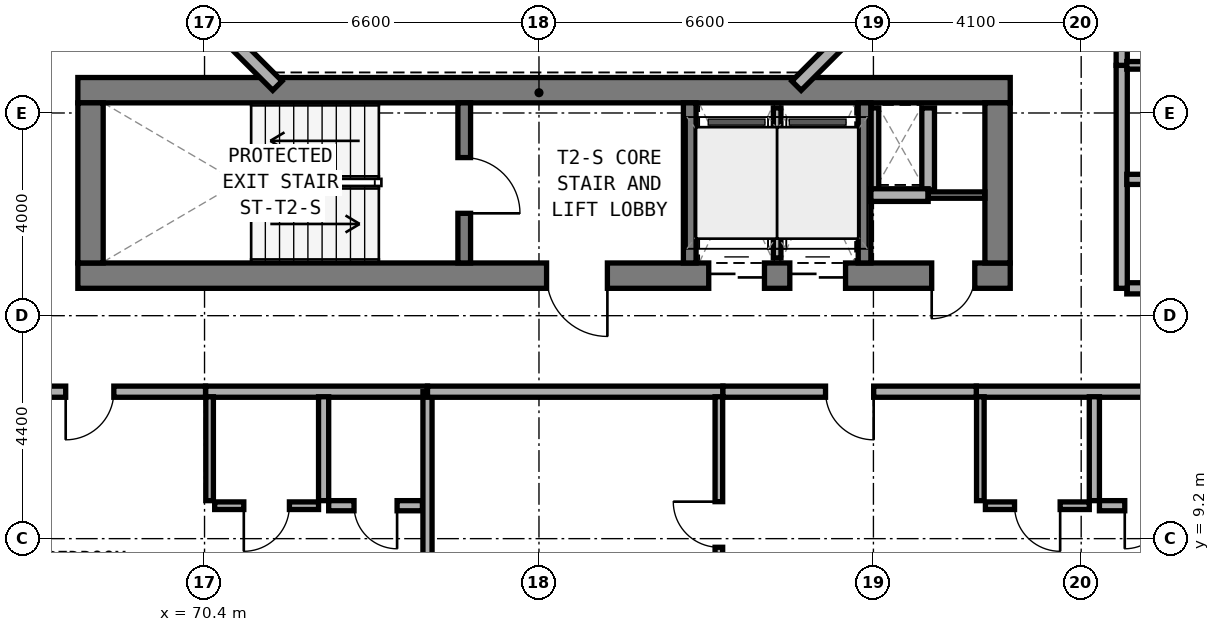
"""IFC4 building model, lengths in metres.
Left out: names, types, materials, properties, quantities, classifications, styles, units other than length and angle.
Written with IfcOpenShell. Run it as: python <this file> out.ifc"""

import sys

from ifc_helpers import new_model, si_unit, direction, frame, frame_2d, origin, place, context, subcontext, project, spatial, rectangle, extrude, element, fill, save


model = new_model("IFC4")
c1 = context("Model", 3, precision=1e-05, world=origin(), true_north=direction((0.0, 1.0)))
c2 = subcontext(c1, "Body", "Model", "MODEL_VIEW")
j1 = project(units=[si_unit("LENGTHUNIT", "METRE"), si_unit("PLANEANGLEUNIT", "RADIAN")], contexts=[c1])
p1 = place(None, origin())
s1 = spatial("IfcSite", under=j1, at=p1, CompositionType="ELEMENT")
p2 = place(p1, origin())
s2 = spatial("IfcBuilding", under=s1, at=p2, CompositionType="ELEMENT")
p3 = place(p2, frame((0.0, 0.0, 73.0)))
s3 = spatial("IfcBuildingStorey", under=s2, at=p3, CompositionType="ELEMENT", Elevation=73.0)
p4 = place(p3, frame((67.9, 14.39, 0.0), z_axis=(0.0, 0.0, 1.0), x_axis=(1.0, 0.0, 0.0)))
e1 = element("IfcWall", 1, at=p4, inside=s3, PredefinedType="SHEAR", context=c2, shape_type="SweptSolid", body=[
    extrude(rectangle(XDim=18.4, YDim=0.5, at=frame_2d((9.2, 0.0))), origin(), (0.0, 0.0, 1.0), 3.5),
])
p5 = place(p4, frame((9.25, 0.0, 0.0)))
e2 = element("IfcOpeningElement", 2, at=p5, cuts=e1, PredefinedType="OPENING", context=c2, shape_type="SweptSolid", body=[
    extrude(rectangle(XDim=1.2, YDim=2.15, at=frame_2d((0.6, 1.075))), frame((0.0, 0.26, 0.0), z_axis=(0.0, -1.0, 0.0), x_axis=(1.0, 0.0, 0.0)), (0.0, 0.0, 1.0), 0.52),
])
p6 = place(p4, frame((16.85, 0.0, 0.0)))
e3 = element("IfcOpeningElement", 3, at=p6, cuts=e1, PredefinedType="OPENING", context=c2, shape_type="SweptSolid", body=[
    extrude(rectangle(XDim=0.85, YDim=2.1, at=frame_2d((0.425, 1.05))), frame((0.0, 0.26, 0.0), z_axis=(0.0, -1.0, 0.0), x_axis=(1.0, 0.0, 0.0)), (0.0, 0.0, 1.0), 0.52),
])
p7 = place(p4, frame((12.45, 0.0, 0.0)))
e4 = element("IfcOpeningElement", 4, at=p7, cuts=e1, PredefinedType="OPENING", context=c2, shape_type="SweptSolid", body=[
    extrude(rectangle(XDim=1.1, YDim=2.15, at=frame_2d((0.55, 1.075))), frame((0.0, 0.26, 0.0), z_axis=(0.0, -1.0, 0.0), x_axis=(1.0, 0.0, 0.0)), (0.0, 0.0, 1.0), 0.52),
])
p8 = place(p4, frame((14.05, 0.0, 0.0)))
e5 = element("IfcOpeningElement", 5, at=p8, cuts=e1, PredefinedType="OPENING", context=c2, shape_type="SweptSolid", body=[
    extrude(rectangle(XDim=1.1, YDim=2.15, at=frame_2d((0.55, 1.075))), frame((0.0, 0.26, 0.0), z_axis=(0.0, -1.0, 0.0), x_axis=(1.0, 0.0, 0.0)), (0.0, 0.0, 1.0), 0.52),
])
p9 = place(p3, frame((67.9, 18.05, 0.0), z_axis=(0.0, 0.0, 1.0), x_axis=(1.0, 0.0, 0.0)))
e6 = element("IfcWall", 6, at=p9, inside=s3, PredefinedType="SHEAR", context=c2, shape_type="SweptSolid", body=[
    extrude(rectangle(XDim=18.4, YDim=0.5, at=frame_2d((9.2, 0.0))), origin(), (0.0, 0.0, 1.0), 3.5),
])
for number, where, z_axis, x_axis in (
    (7, (68.15, 14.64, 0.0), (0.0, 0.0, 1.0), (0.0, 1.0, 0.0)),
    (8, (86.05, 14.64, 0.0), (0.0, 0.0, 1.0), (0.0, 1.0, 0.0)),
):
    element("IfcWall", number, at=place(p3, frame(where, z_axis=z_axis, x_axis=x_axis)), inside=s3, PredefinedType="SHEAR", context=c2, shape_type="SweptSolid", body=[
        extrude(rectangle(XDim=3.16, YDim=0.5, at=frame_2d((1.58, 0.0))), origin(), (0.0, 0.0, 1.0), 3.5),
    ])
p10 = place(p3, frame((75.525, 14.64, 0.0), z_axis=(0.0, 0.0, 1.0), x_axis=(0.0, 1.0, 0.0)))
e9 = element("IfcWall", 9, at=p10, inside=s3, PredefinedType="STANDARD", context=c2, shape_type="SweptSolid", body=[
    extrude(rectangle(XDim=3.16, YDim=0.25, at=frame_2d((1.58, 0.0))), origin(), (0.0, 0.0, 1.0), 3.25),
])
p11 = place(p10, frame((0.98, 0.0, 0.0)))
e10 = element("IfcOpeningElement", 10, at=p11, cuts=e9, PredefinedType="OPENING", context=c2, shape_type="SweptSolid", body=[
    extrude(rectangle(XDim=1.1, YDim=2.15, at=frame_2d((0.55, 1.075))), frame((0.0, 0.135, 0.0), z_axis=(0.0, -1.0, 0.0), x_axis=(1.0, 0.0, 0.0)), (0.0, 0.0, 1.0), 0.27),
])
for number, where, z_axis, x_axis in (
    (11, (79.975, 14.64, 0.0), (0.0, 0.0, 1.0), (0.0, 1.0, 0.0)),
    (12, (83.425, 14.64, 0.0), (0.0, 0.0, 1.0), (0.0, 1.0, 0.0)),
):
    element("IfcWall", number, at=place(p3, frame(where, z_axis=z_axis, x_axis=x_axis)), inside=s3, PredefinedType="STANDARD", context=c2, shape_type="SweptSolid", body=[
        extrude(rectangle(XDim=3.16, YDim=0.25, at=frame_2d((1.58, 0.0))), origin(), (0.0, 0.0, 1.0), 3.25),
    ])
for number, where, z_axis, x_axis in (
    (13, (82.082, 18.138, 0.0), (0.0, 0.0, 1.0), (0.707, 0.707, 0.0)),
    (14, (70.204, 19.772, 0.0), (0.0, 0.0, 1.0), (0.707, -0.707, 0.0)),
):
    element("IfcWall", number, at=place(p3, frame(where, z_axis=z_axis, x_axis=x_axis)), inside=s3, PredefinedType="STANDARD", context=c2, shape_type="SweptSolid", body=[
        extrude(rectangle(XDim=2.311, YDim=0.26, at=frame_2d((1.155, 0.0))), origin(), (0.0, 0.0, 1.0), 3.25),
    ])
p12 = place(p3, frame((83.63, 16.08, 0.0), z_axis=(0.0, 0.0, 1.0), x_axis=(0.0, 1.0, 0.0)))
e15 = element("IfcWall", 15, at=p12, inside=s3, PredefinedType="PARTITIONING", context=c2, shape_type="SweptSolid", body=[
    extrude(rectangle(XDim=1.62, YDim=0.15, at=frame_2d((0.81, 0.0))), origin(), (0.0, 0.0, 1.0), 2.725),
])
p13 = place(p3, frame((84.68, 16.08, 0.0), z_axis=(0.0, 0.0, 1.0), x_axis=(0.0, 1.0, 0.0)))
e16 = element("IfcWall", 16, at=p13, inside=s3, PredefinedType="SOLIDWALL", context=c2, shape_type="SweptSolid", body=[
    extrude(rectangle(XDim=1.62, YDim=0.25, at=frame_2d((0.81, 0.0))), origin(), (0.0, 0.0, 1.0), 3.22),
])
p14 = place(p3, frame((83.55, 15.98, 0.0), z_axis=(0.0, 0.0, 1.0), x_axis=(1.0, 0.0, 0.0)))
e17 = element("IfcWall", 17, at=p14, inside=s3, PredefinedType="SOLIDWALL", context=c2, shape_type="SweptSolid", body=[
    extrude(rectangle(XDim=1.13, YDim=0.25, at=frame_2d((0.565, 0.0))), origin(), (0.0, 0.0, 1.0), 3.22),
])
p15 = place(p3, frame((84.68, 15.98, 0.0), z_axis=(0.0, 0.0, 1.0), x_axis=(1.0, 0.0, 0.0)))
e18 = element("IfcWall", 18, at=p15, inside=s3, PredefinedType="PARTITIONING", context=c2, shape_type="SweptSolid", body=[
    extrude(rectangle(XDim=1.12, YDim=0.125, at=frame_2d((0.56, 0.0))), origin(), (0.0, 0.0, 1.0), 3.22),
])
p16 = place(p3, frame((81.7, 14.74, 0.0), z_axis=(0.0, 0.0, 1.0), x_axis=(0.0, 1.0, 0.0)))
e19 = element("IfcWall", 19, at=p16, inside=s3, PredefinedType="PARTITIONING", context=c2, shape_type="SweptSolid", body=[
    extrude(rectangle(XDim=2.96, YDim=0.15, at=frame_2d((1.48, 0.0))), origin(), (0.0, 0.0, 1.0), 3.22),
])
p17 = place(p3, frame((70.42, 12.1, 0.0), z_axis=(0.0, 0.0, 1.0), x_axis=(1.0, 0.0, 0.0)))
e20 = element("IfcWall", 20, at=p17, inside=s3, PredefinedType="SOLIDWALL", context=c2, shape_type="SweptSolid", body=[
    extrude(rectangle(XDim=4.38, YDim=0.22, at=frame_2d((2.19, 0.0))), origin(), (0.0, 0.0, 1.0), 2.725),
])
p18 = place(p3, frame((65.85, 12.1, 0.0), z_axis=(0.0, 0.0, 1.0), x_axis=(1.0, 0.0, 0.0)))
e21 = element("IfcWall", 21, at=p18, inside=s3, PredefinedType="SOLIDWALL", context=c2, shape_type="SweptSolid", body=[
    extrude(rectangle(XDim=4.57, YDim=0.22, at=frame_2d((2.285, 0.0))), origin(), (0.0, 0.0, 1.0), 3.22),
])
p19 = place(p18, frame((1.81, 0.0, 0.0)))
e22 = element("IfcOpeningElement", 22, at=p19, cuts=e21, PredefinedType="OPENING", context=c2, shape_type="SweptSolid", body=[
    extrude(rectangle(XDim=0.95, YDim=2.1, at=frame_2d((0.475, 1.05))), frame((0.0, 0.12, 0.0), z_axis=(0.0, -1.0, 0.0), x_axis=(1.0, 0.0, 0.0)), (0.0, 0.0, 1.0), 0.24),
])
p20 = place(p3, frame((72.75, 9.95, 0.0), z_axis=(0.0, 0.0, 1.0), x_axis=(0.0, 1.0, 0.0)))
e23 = element("IfcWall", 23, at=p20, inside=s3, PredefinedType="PLUMBINGWALL", context=c2, shape_type="SweptSolid", body=[
    extrude(rectangle(XDim=2.05, YDim=0.2, at=frame_2d((1.025, 0.0))), origin(), (0.0, 0.0, 1.0), 2.725),
])
p21 = place(p3, frame((70.5, 9.95, 0.0), z_axis=(0.0, 0.0, 1.0), x_axis=(0.0, 1.0, 0.0)))
e24 = element("IfcWall", 24, at=p21, inside=s3, PredefinedType="PARTITIONING", context=c2, shape_type="SweptSolid", body=[
    extrude(rectangle(XDim=2.05, YDim=0.15, at=frame_2d((1.025, 0.0))), origin(), (0.0, 0.0, 1.0), 3.22),
])
p22 = place(p3, frame((72.85, 9.85, 0.0), z_axis=(0.0, 0.0, 1.0), x_axis=(1.0, 0.0, 0.0)))
e25 = element("IfcWall", 25, at=p22, inside=s3, PredefinedType="PLUMBINGWALL", context=c2, shape_type="SweptSolid", body=[
    extrude(rectangle(XDim=1.85, YDim=0.2, at=frame_2d((0.925, 0.0))), origin(), (0.0, 0.0, 1.0), 3.22),
])
p23 = place(p22, frame((0.5, 0.0, 0.0)))
e26 = element("IfcOpeningElement", 26, at=p23, cuts=e25, PredefinedType="OPENING", context=c2, shape_type="SweptSolid", body=[
    extrude(rectangle(XDim=0.85, YDim=2.1, at=frame_2d((0.425, 1.05))), frame((0.0, 0.11, 0.0), z_axis=(0.0, -1.0, 0.0), x_axis=(1.0, 0.0, 0.0)), (0.0, 0.0, 1.0), 0.22),
])
p24 = place(p3, frame((70.6, 9.85, 0.0), z_axis=(0.0, 0.0, 1.0), x_axis=(1.0, 0.0, 0.0)))
e27 = element("IfcWall", 27, at=p24, inside=s3, PredefinedType="PARTITIONING", context=c2, shape_type="SweptSolid", body=[
    extrude(rectangle(XDim=2.05, YDim=0.15, at=frame_2d((1.025, 0.0))), origin(), (0.0, 0.0, 1.0), 2.725),
])
p25 = place(p24, frame((0.575, 0.0, 0.0)))
e28 = element("IfcOpeningElement", 28, at=p25, cuts=e27, PredefinedType="OPENING", context=c2, shape_type="SweptSolid", body=[
    extrude(rectangle(XDim=0.9, YDim=2.1, at=frame_2d((0.45, 1.05))), frame((0.0, 0.085, 0.0), z_axis=(0.0, -1.0, 0.0), x_axis=(1.0, 0.0, 0.0)), (0.0, 0.0, 1.0), 0.17),
])
p26 = place(p3, frame((74.8, 5.06, 0.0), z_axis=(0.0, 0.0, 1.0), x_axis=(0.0, 1.0, 0.0)))
e29 = element("IfcWall", 29, at=p26, inside=s3, PredefinedType="SOLIDWALL", context=c2, shape_type="SweptSolid", body=[
    extrude(rectangle(XDim=7.04, YDim=0.18, at=frame_2d((3.52, 0.0))), origin(), (0.0, 0.0, 1.0), 2.865),
])
p27 = place(p3, frame((74.8, 12.1, 0.0), z_axis=(0.0, 0.0, 1.0), x_axis=(1.0, 0.0, 0.0)))
e30 = element("IfcWall", 30, at=p27, inside=s3, PredefinedType="SOLIDWALL", context=c2, shape_type="SweptSolid", body=[
    extrude(rectangle(XDim=5.83, YDim=0.22, at=frame_2d((2.915, 0.0))), origin(), (0.0, 0.0, 1.0), 3.22),
])
p28 = place(p3, frame((85.63, 12.1, 0.0), z_axis=(0.0, 0.0, 1.0), x_axis=(1.0, 0.0, 0.0)))
e31 = element("IfcWall", 31, at=p28, inside=s3, PredefinedType="SOLIDWALL", context=c2, shape_type="SweptSolid", body=[
    extrude(rectangle(XDim=10.13, YDim=0.22, at=frame_2d((5.065, 0.0))), origin(), (0.0, 0.0, 1.0), 2.865),
])
p29 = place(p3, frame((80.63, 12.1, 0.0), z_axis=(0.0, 0.0, 1.0), x_axis=(1.0, 0.0, 0.0)))
e32 = element("IfcWall", 32, at=p29, inside=s3, PredefinedType="SOLIDWALL", context=c2, shape_type="SweptSolid", body=[
    extrude(rectangle(XDim=5.0, YDim=0.22, at=frame_2d((2.5, 0.0))), origin(), (0.0, 0.0, 1.0), 2.725),
])
p30 = place(p29, frame((2.025, 0.0, 0.0)))
e33 = element("IfcOpeningElement", 33, at=p30, cuts=e32, PredefinedType="OPENING", context=c2, shape_type="SweptSolid", body=[
    extrude(rectangle(XDim=0.95, YDim=2.1, at=frame_2d((0.475, 1.05))), frame((0.0, 0.12, 0.0), z_axis=(0.0, -1.0, 0.0), x_axis=(1.0, 0.0, 0.0)), (0.0, 0.0, 1.0), 0.24),
])
p31 = place(p3, frame((80.55, 5.16, 0.0), z_axis=(0.0, 0.0, 1.0), x_axis=(0.0, 1.0, 0.0)))
e34 = element("IfcWall", 34, at=p31, inside=s3, PredefinedType="PARTITIONING", context=c2, shape_type="SweptSolid", body=[
    extrude(rectangle(XDim=6.84, YDim=0.15, at=frame_2d((3.42, 0.0))), origin(), (0.0, 0.0, 1.0), 2.865),
])
p32 = place(p31, frame((3.87, 0.0, 0.0)))
e35 = element("IfcOpeningElement", 35, at=p32, cuts=e34, PredefinedType="OPENING", context=c2, shape_type="SweptSolid", body=[
    extrude(rectangle(XDim=0.9, YDim=2.1, at=frame_2d((0.45, 1.05))), frame((0.0, 0.085, 0.0), z_axis=(0.0, -1.0, 0.0), x_axis=(1.0, 0.0, 0.0)), (0.0, 0.0, 1.0), 0.17),
])
p33 = place(p3, frame((87.96, 9.95, 0.0), z_axis=(0.0, 0.0, 1.0), x_axis=(0.0, 1.0, 0.0)))
e36 = element("IfcWall", 36, at=p33, inside=s3, PredefinedType="PLUMBINGWALL", context=c2, shape_type="SweptSolid", body=[
    extrude(rectangle(XDim=2.05, YDim=0.2, at=frame_2d((1.025, 0.0))), origin(), (0.0, 0.0, 1.0), 3.22),
])
p34 = place(p3, frame((85.71, 9.95, 0.0), z_axis=(0.0, 0.0, 1.0), x_axis=(0.0, 1.0, 0.0)))
e37 = element("IfcWall", 37, at=p34, inside=s3, PredefinedType="PARTITIONING", context=c2, shape_type="SweptSolid", body=[
    extrude(rectangle(XDim=2.05, YDim=0.15, at=frame_2d((1.025, 0.0))), origin(), (0.0, 0.0, 1.0), 3.22),
])
p35 = place(p3, frame((88.06, 9.85, 0.0), z_axis=(0.0, 0.0, 1.0), x_axis=(1.0, 0.0, 0.0)))
e38 = element("IfcWall", 38, at=p35, inside=s3, PredefinedType="PLUMBINGWALL", context=c2, shape_type="SweptSolid", body=[
    extrude(rectangle(XDim=1.85, YDim=0.2, at=frame_2d((0.925, 0.0))), origin(), (0.0, 0.0, 1.0), 3.22),
])
p36 = place(p35, frame((0.5, 0.0, 0.0)))
e39 = element("IfcOpeningElement", 39, at=p36, cuts=e38, PredefinedType="OPENING", context=c2, shape_type="SweptSolid", body=[
    extrude(rectangle(XDim=0.85, YDim=2.1, at=frame_2d((0.425, 1.05))), frame((0.0, 0.11, 0.0), z_axis=(0.0, -1.0, 0.0), x_axis=(1.0, 0.0, 0.0)), (0.0, 0.0, 1.0), 0.22),
])
p37 = place(p3, frame((85.81, 9.85, 0.0), z_axis=(0.0, 0.0, 1.0), x_axis=(1.0, 0.0, 0.0)))
e40 = element("IfcWall", 40, at=p37, inside=s3, PredefinedType="PARTITIONING", context=c2, shape_type="SweptSolid", body=[
    extrude(rectangle(XDim=2.05, YDim=0.15, at=frame_2d((1.025, 0.0))), origin(), (0.0, 0.0, 1.0), 3.22),
])
p38 = place(p37, frame((0.575, 0.0, 0.0)))
e41 = element("IfcOpeningElement", 41, at=p38, cuts=e40, PredefinedType="OPENING", context=c2, shape_type="SweptSolid", body=[
    extrude(rectangle(XDim=0.9, YDim=2.1, at=frame_2d((0.45, 1.05))), frame((0.0, 0.085, 0.0), z_axis=(0.0, -1.0, 0.0), x_axis=(1.0, 0.0, 0.0)), (0.0, 0.0, 1.0), 0.17),
])
p39 = place(p3, frame((88.6, 14.14, 0.0), z_axis=(0.0, 0.0, 1.0), x_axis=(1.0, 0.0, 0.0)))
e42 = element("IfcWall", 42, at=p39, inside=s3, PredefinedType="SOLIDWALL", context=c2, shape_type="SweptSolid", body=[
    extrude(rectangle(XDim=7.0, YDim=0.22, at=frame_2d((3.5, 0.0))), origin(), (0.0, 0.0, 1.0), 2.865),
])
p40 = place(p3, frame((88.5, 14.14, 0.0), z_axis=(0.0, 0.0, 1.0), x_axis=(0.0, 1.0, 0.0)))
e43 = element("IfcWall", 43, at=p40, inside=s3, PredefinedType="SOLIDWALL", context=c2, shape_type="SweptSolid", body=[
    extrude(rectangle(XDim=4.4, YDim=0.22, at=frame_2d((2.2, 0.0))), origin(), (0.0, 0.0, 1.0), 3.22),
])
p41 = place(p3, frame((88.5, 18.54, 0.0), z_axis=(0.0, 0.0, 1.0), x_axis=(0.0, 1.0, 0.0)))
e44 = element("IfcWall", 44, at=p41, inside=s3, PredefinedType="SOLIDWALL", context=c2, shape_type="SweptSolid", body=[
    extrude(rectangle(XDim=6.46, YDim=0.22, at=frame_2d((3.23, 0.0))), origin(), (0.0, 0.0, 1.0), 2.725),
])
p42 = place(p41, frame((0.855, 0.0, 0.0)))
e45 = element("IfcOpeningElement", 45, at=p42, cuts=e44, PredefinedType="OPENING", context=c2, shape_type="SweptSolid", body=[
    extrude(rectangle(XDim=0.95, YDim=2.1, at=frame_2d((0.475, 1.05))), frame((0.0, 0.12, 0.0), z_axis=(0.0, -1.0, 0.0), x_axis=(1.0, 0.0, 0.0)), (0.0, 0.0, 1.0), 0.24),
])
p43 = place(p3, frame((88.6, 16.29, 0.0), z_axis=(0.0, 0.0, 1.0), x_axis=(1.0, 0.0, 0.0)))
e46 = element("IfcWall", 46, at=p43, inside=s3, PredefinedType="PLUMBINGWALL", context=c2, shape_type="SweptSolid", body=[
    extrude(rectangle(XDim=2.0, YDim=0.2, at=frame_2d((1.0, 0.0))), origin(), (0.0, 0.0, 1.0), 3.22),
])
p44 = place(p3, frame((88.6, 18.54, 0.0), z_axis=(0.0, 0.0, 1.0), x_axis=(1.0, 0.0, 0.0)))
e47 = element("IfcWall", 47, at=p44, inside=s3, PredefinedType="PARTITIONING", context=c2, shape_type="SweptSolid", body=[
    extrude(rectangle(XDim=2.0, YDim=0.15, at=frame_2d((1.0, 0.0))), origin(), (0.0, 0.0, 1.0), 3.22),
])
p45 = place(p11, frame((1.1, 0.0, 0.0), z_axis=(0.0, 0.0, 1.0), x_axis=(-1.0, 0.0, 0.0)))
e48 = element("IfcDoor", 48, at=p45, inside=s3, OperationType="SINGLE_SWING_RIGHT", PredefinedType="DOOR", context=c2, shape_type="SweptSolid", body=[
    extrude(rectangle(XDim=1.1, YDim=2.15, at=frame_2d((0.55, 1.075))), frame((0.0, 0.025, 0.0), z_axis=(0.0, -1.0, 0.0), x_axis=(1.0, 0.0, 0.0)), (0.0, 0.0, 1.0), 0.05),
])
fill(e10, e48)
p46 = place(p5, frame((1.2, 0.0, 0.0), z_axis=(0.0, 0.0, 1.0), x_axis=(-1.0, 0.0, 0.0)))
e49 = element("IfcDoor", 49, at=p46, inside=s3, OperationType="SINGLE_SWING_LEFT", PredefinedType="DOOR", context=c2, shape_type="SweptSolid", body=[
    extrude(rectangle(XDim=1.2, YDim=2.15, at=frame_2d((0.6, 1.075))), frame((0.0, 0.025, 0.0), z_axis=(0.0, -1.0, 0.0), x_axis=(1.0, 0.0, 0.0)), (0.0, 0.0, 1.0), 0.05),
])
fill(e2, e49)
p47 = place(p6, frame((0.85, 0.0, 0.0), z_axis=(0.0, 0.0, 1.0), x_axis=(-1.0, 0.0, 0.0)))
e50 = element("IfcDoor", 50, at=p47, inside=s3, OperationType="SINGLE_SWING_RIGHT", PredefinedType="DOOR", context=c2, shape_type="SweptSolid", body=[
    extrude(rectangle(XDim=0.85, YDim=2.1, at=frame_2d((0.425, 1.05))), frame((0.0, 0.025, 0.0), z_axis=(0.0, -1.0, 0.0), x_axis=(1.0, 0.0, 0.0)), (0.0, 0.0, 1.0), 0.05),
])
fill(e3, e50)
p48 = place(p7, frame((1.1, 0.0, 0.0), z_axis=(0.0, 0.0, 1.0), x_axis=(-1.0, 0.0, 0.0)))
e51 = element("IfcDoor", 51, at=p48, inside=s3, OperationType="DOUBLE_DOOR_SLIDING", PredefinedType="DOOR", context=c2, shape_type="SweptSolid", body=[
    extrude(rectangle(XDim=1.1, YDim=2.15, at=frame_2d((0.55, 1.075))), frame((0.0, 0.025, 0.0), z_axis=(0.0, -1.0, 0.0), x_axis=(1.0, 0.0, 0.0)), (0.0, 0.0, 1.0), 0.05),
])
fill(e4, e51)
p49 = place(p8, frame((1.1, 0.0, 0.0), z_axis=(0.0, 0.0, 1.0), x_axis=(-1.0, 0.0, 0.0)))
e52 = element("IfcDoor", 52, at=p49, inside=s3, OperationType="DOUBLE_DOOR_SLIDING", PredefinedType="DOOR", context=c2, shape_type="SweptSolid", body=[
    extrude(rectangle(XDim=1.1, YDim=2.15, at=frame_2d((0.55, 1.075))), frame((0.0, 0.025, 0.0), z_axis=(0.0, -1.0, 0.0), x_axis=(1.0, 0.0, 0.0)), (0.0, 0.0, 1.0), 0.05),
])
fill(e5, e52)
p50 = place(p19, frame((0.95, 0.0, 0.0), z_axis=(0.0, 0.0, 1.0), x_axis=(-1.0, 0.0, 0.0)))
e53 = element("IfcDoor", 53, at=p50, inside=s3, OperationType="SINGLE_SWING_RIGHT", PredefinedType="DOOR", context=c2, shape_type="SweptSolid", body=[
    extrude(rectangle(XDim=0.95, YDim=2.1, at=frame_2d((0.475, 1.05))), frame((0.0, 0.025, 0.0), z_axis=(0.0, -1.0, 0.0), x_axis=(1.0, 0.0, 0.0)), (0.0, 0.0, 1.0), 0.05),
])
fill(e22, e53)
p51 = place(p23, frame((0.85, 0.0, 0.0), z_axis=(0.0, 0.0, 1.0), x_axis=(-1.0, 0.0, 0.0)))
e54 = element("IfcDoor", 54, at=p51, inside=s3, OperationType="SINGLE_SWING_LEFT", PredefinedType="DOOR", context=c2, shape_type="SweptSolid", body=[
    extrude(rectangle(XDim=0.85, YDim=2.1, at=frame_2d((0.425, 1.05))), frame((0.0, 0.025, 0.0), z_axis=(0.0, -1.0, 0.0), x_axis=(1.0, 0.0, 0.0)), (0.0, 0.0, 1.0), 0.05),
])
fill(e26, e54)
p52 = place(p25, frame((0.9, 0.0, 0.0), z_axis=(0.0, 0.0, 1.0), x_axis=(-1.0, 0.0, 0.0)))
e55 = element("IfcDoor", 55, at=p52, inside=s3, OperationType="SINGLE_SWING_RIGHT", PredefinedType="DOOR", context=c2, shape_type="SweptSolid", body=[
    extrude(rectangle(XDim=0.9, YDim=2.1, at=frame_2d((0.45, 1.05))), frame((0.0, 0.025, 0.0), z_axis=(0.0, -1.0, 0.0), x_axis=(1.0, 0.0, 0.0)), (0.0, 0.0, 1.0), 0.05),
])
fill(e28, e55)
p53 = place(p30, frame((0.95, 0.0, 0.0), z_axis=(0.0, 0.0, 1.0), x_axis=(-1.0, 0.0, 0.0)))
e56 = element("IfcDoor", 56, at=p53, inside=s3, OperationType="SINGLE_SWING_LEFT", PredefinedType="DOOR", context=c2, shape_type="SweptSolid", body=[
    extrude(rectangle(XDim=0.95, YDim=2.1, at=frame_2d((0.475, 1.05))), frame((0.0, 0.025, 0.0), z_axis=(0.0, -1.0, 0.0), x_axis=(1.0, 0.0, 0.0)), (0.0, 0.0, 1.0), 0.05),
])
fill(e33, e56)
p54 = place(p32, origin())
e57 = element("IfcDoor", 57, at=p54, inside=s3, OperationType="SINGLE_SWING_RIGHT", PredefinedType="DOOR", context=c2, shape_type="SweptSolid", body=[
    extrude(rectangle(XDim=0.9, YDim=2.1, at=frame_2d((0.45, 1.05))), frame((0.0, 0.025, 0.0), z_axis=(0.0, -1.0, 0.0), x_axis=(1.0, 0.0, 0.0)), (0.0, 0.0, 1.0), 0.05),
])
fill(e35, e57)
p55 = place(p36, frame((0.85, 0.0, 0.0), z_axis=(0.0, 0.0, 1.0), x_axis=(-1.0, 0.0, 0.0)))
e58 = element("IfcDoor", 58, at=p55, inside=s3, OperationType="SINGLE_SWING_RIGHT", PredefinedType="DOOR", context=c2, shape_type="SweptSolid", body=[
    extrude(rectangle(XDim=0.85, YDim=2.1, at=frame_2d((0.425, 1.05))), frame((0.0, 0.025, 0.0), z_axis=(0.0, -1.0, 0.0), x_axis=(1.0, 0.0, 0.0)), (0.0, 0.0, 1.0), 0.05),
])
fill(e39, e58)
p56 = place(p38, frame((0.9, 0.0, 0.0), z_axis=(0.0, 0.0, 1.0), x_axis=(-1.0, 0.0, 0.0)))
e59 = element("IfcDoor", 59, at=p56, inside=s3, OperationType="SINGLE_SWING_LEFT", PredefinedType="DOOR", context=c2, shape_type="SweptSolid", body=[
    extrude(rectangle(XDim=0.9, YDim=2.1, at=frame_2d((0.45, 1.05))), frame((0.0, 0.025, 0.0), z_axis=(0.0, -1.0, 0.0), x_axis=(1.0, 0.0, 0.0)), (0.0, 0.0, 1.0), 0.05),
])
fill(e41, e59)
save(model, sys.argv[1])
